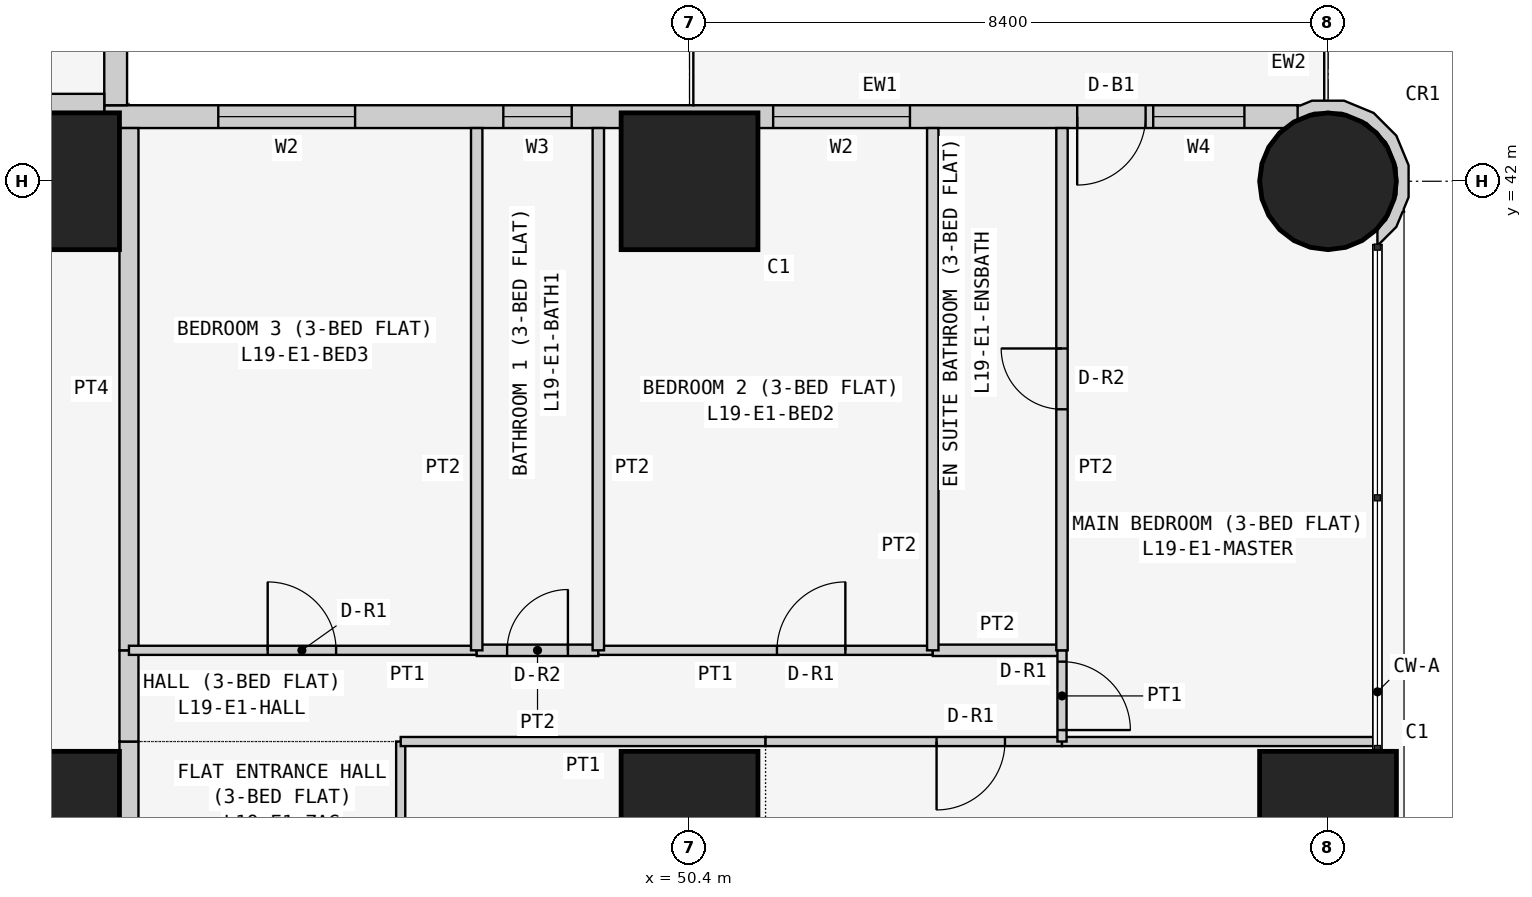
"""IFC4 building model, lengths in metres.
Left out: names, types, materials, properties, quantities, classifications, styles, units other than length and angle.
Written with IfcOpenShell. Run it as: python <this file> out.ifc"""

import sys

from ifc_helpers import new_model, si_unit, direction, frame, frame_2d, origin, origin_2d, place, context, subcontext, project, spatial, polyline, rectangle, circle, outline, extrude, element, fill, save


model = new_model("IFC4")
c1 = context("Model", 3, precision=1e-05, world=origin(), true_north=direction((0.0, 1.0)))
c2 = subcontext(c1, "Body", "Model", "MODEL_VIEW")
j1 = project(units=[si_unit("LENGTHUNIT", "METRE"), si_unit("PLANEANGLEUNIT", "RADIAN")], contexts=[c1])
p1 = place(None, origin())
s1 = spatial("IfcSite", under=j1, at=p1, CompositionType="ELEMENT")
p2 = place(p1, origin())
s2 = spatial("IfcBuilding", under=s1, at=p2, CompositionType="ELEMENT")
p3 = place(p2, frame((0.0, 0.0, 77.7)))
s3 = spatial("IfcBuildingStorey", under=s2, at=p3, CompositionType="ELEMENT", Elevation=77.7)
for number, where, z_axis, x_axis in (
    (1, (42.0, 33.6, 0.0), (0.0, 0.0, 1.0), (1.0, 0.0, 0.0)),
    (2, (42.0, 42.0, 0.0), (0.0, 0.0, 1.0), (1.0, 0.0, 0.0)),
    (3, (50.4, 33.6, 0.0), (0.0, 0.0, 1.0), (1.0, 0.0, 0.0)),
    (4, (50.4, 42.0, 0.0), (0.0, 0.0, 1.0), (1.0, 0.0, 0.0)),
    (5, (58.8, 33.6, 0.0), (0.0, 0.0, 1.0), (1.0, 0.0, 0.0)),
):
    element("IfcColumn", number, at=place(p3, frame(where, z_axis=z_axis, x_axis=x_axis)), inside=s3, PredefinedType="COLUMN", context=c2, shape_type="SweptSolid", body=[
        extrude(rectangle(XDim=1.8, YDim=1.8, at=origin_2d()), origin(), (0.0, 0.0, 1.0), 3.6),
    ])
p4 = place(p3, frame((58.8, 42.0, 0.0), z_axis=(0.0, 0.0, 1.0), x_axis=(1.0, 0.0, 0.0)))
e6 = element("IfcColumn", 6, at=p4, inside=s3, PredefinedType="COLUMN", context=c2, shape_type="SweptSolid", body=[
    extrude(circle(Radius=0.9, at=origin_2d()), origin(), (0.0, 0.0, 1.0), 3.6),
])
p5 = place(p3, frame((58.4, 42.85, 0.0), z_axis=(0.0, 0.0, 1.0), x_axis=(-1.0, 0.0, 0.0)))
e7 = element("IfcWall", 7, at=p5, inside=s3, PredefinedType="SOLIDWALL", context=c2, shape_type="SweptSolid", body=[
    extrude(rectangle(XDim=15.7, YDim=0.3, at=frame_2d((7.85, 0.0))), origin(), (0.0, 0.0, 1.0), 3.45),
])
p6 = place(p5, frame((12.4, 0.0, 0.9)))
e8 = element("IfcOpeningElement", 8, at=p6, cuts=e7, PredefinedType="OPENING", context=c2, shape_type="SweptSolid", body=[
    extrude(rectangle(XDim=1.8, YDim=1.5, at=frame_2d((0.9, 0.75))), frame((0.0, 0.16, 0.0), z_axis=(0.0, -1.0, 0.0), x_axis=(1.0, 0.0, 0.0)), (0.0, 0.0, 1.0), 0.32),
])
p7 = place(p5, frame((9.55, 0.0, 1.5)))
e9 = element("IfcOpeningElement", 9, at=p7, cuts=e7, PredefinedType="OPENING", context=c2, shape_type="SweptSolid", body=[
    extrude(rectangle(XDim=0.9, YDim=0.7, at=frame_2d((0.45, 0.35))), frame((0.0, 0.16, 0.0), z_axis=(0.0, -1.0, 0.0), x_axis=(1.0, 0.0, 0.0)), (0.0, 0.0, 1.0), 0.32),
])
p8 = place(p5, frame((5.1, 0.0, 0.9)))
e10 = element("IfcOpeningElement", 10, at=p8, cuts=e7, PredefinedType="OPENING", context=c2, shape_type="SweptSolid", body=[
    extrude(rectangle(XDim=1.8, YDim=1.5, at=frame_2d((0.9, 0.75))), frame((0.0, 0.16, 0.0), z_axis=(0.0, -1.0, 0.0), x_axis=(1.0, 0.0, 0.0)), (0.0, 0.0, 1.0), 0.32),
])
p9 = place(p5, frame((2.0, 0.0, 0.0)))
e11 = element("IfcOpeningElement", 11, at=p9, cuts=e7, PredefinedType="OPENING", context=c2, shape_type="SweptSolid", body=[
    extrude(rectangle(XDim=0.9, YDim=2.4, at=frame_2d((0.45, 1.2))), frame((0.0, 0.16, 0.0), z_axis=(0.0, -1.0, 0.0), x_axis=(1.0, 0.0, 0.0)), (0.0, 0.0, 1.0), 0.32),
])
p10 = place(p5, frame((0.7, 0.0, 0.9)))
e12 = element("IfcOpeningElement", 12, at=p10, cuts=e7, PredefinedType="OPENING", context=c2, shape_type="SweptSolid", body=[
    extrude(rectangle(XDim=1.2, YDim=1.5, at=frame_2d((0.6, 0.75))), frame((0.0, 0.16, 0.0), z_axis=(0.0, -1.0, 0.0), x_axis=(1.0, 0.0, 0.0)), (0.0, 0.0, 1.0), 0.32),
])
p11 = place(p3, frame((42.85, 43.0, 0.0), z_axis=(0.0, 0.0, 1.0), x_axis=(0.0, 1.0, 0.0)))
e13 = element("IfcWall", 13, at=p11, inside=s3, PredefinedType="SOLIDWALL", context=c2, shape_type="SweptSolid", body=[
    extrude(rectangle(XDim=15.4, YDim=0.3, at=frame_2d((7.7, 0.0))), origin(), (0.0, 0.0, 1.0), 3.45),
])
p12 = place(p11, frame((1.2, 0.0, 0.9)))
e14 = element("IfcOpeningElement", 14, at=p12, cuts=e13, PredefinedType="OPENING", context=c2, shape_type="SweptSolid", body=[
    extrude(rectangle(XDim=1.8, YDim=1.5, at=frame_2d((0.9, 0.75))), frame((0.0, 0.16, 0.0), z_axis=(0.0, -1.0, 0.0), x_axis=(1.0, 0.0, 0.0)), (0.0, 0.0, 1.0), 0.32),
])
p13 = place(p11, frame((4.95, 0.0, 1.5)))
e15 = element("IfcOpeningElement", 15, at=p13, cuts=e13, PredefinedType="OPENING", context=c2, shape_type="SweptSolid", body=[
    extrude(rectangle(XDim=0.9, YDim=0.7, at=frame_2d((0.45, 0.35))), frame((0.0, 0.16, 0.0), z_axis=(0.0, -1.0, 0.0), x_axis=(1.0, 0.0, 0.0)), (0.0, 0.0, 1.0), 0.32),
])
p14 = place(p11, frame((8.5, 0.0, 0.9)))
e16 = element("IfcOpeningElement", 16, at=p14, cuts=e13, PredefinedType="OPENING", context=c2, shape_type="SweptSolid", body=[
    extrude(rectangle(XDim=1.8, YDim=1.5, at=frame_2d((0.9, 0.75))), frame((0.0, 0.16, 0.0), z_axis=(0.0, -1.0, 0.0), x_axis=(1.0, 0.0, 0.0)), (0.0, 0.0, 1.0), 0.32),
])
p15 = place(p11, frame((12.5, 0.0, 0.0)))
e17 = element("IfcOpeningElement", 17, at=p15, cuts=e13, PredefinedType="OPENING", context=c2, shape_type="SweptSolid", body=[
    extrude(rectangle(XDim=0.9, YDim=2.4, at=frame_2d((0.45, 1.2))), frame((0.0, 0.16, 0.0), z_axis=(0.0, -1.0, 0.0), x_axis=(1.0, 0.0, 0.0)), (0.0, 0.0, 1.0), 0.32),
])
p16 = place(p11, frame((13.5, 0.0, 0.9)))
e18 = element("IfcOpeningElement", 18, at=p16, cuts=e13, PredefinedType="OPENING", context=c2, shape_type="SweptSolid", body=[
    extrude(rectangle(XDim=1.2, YDim=1.5, at=frame_2d((0.6, 0.75))), frame((0.0, 0.16, 0.0), z_axis=(0.0, -1.0, 0.0), x_axis=(1.0, 0.0, 0.0)), (0.0, 0.0, 1.0), 0.32),
])
p17 = place(p3, frame((59.411, 41.233, 0.0), z_axis=(0.0, 0.0, 1.0), x_axis=(0.926129809145, 0.377204953059, 0.0)))
e19 = element("IfcWall", 19, at=p17, inside=s3, PredefinedType="SOLIDWALL", context=c2, shape_type="SweptSolid", body=[
    extrude(outline(polyline([(0.626, 0.345), (0.785, 0.736), (0.782, 1.157), (0.619, 1.546), (0.319, 1.843), (-0.072, 2.002), (-0.24, 2.001), (-0.27, 2.017), (-0.37, 1.841), (-0.102, 1.842), (0.23, 1.707), (0.485, 1.455), (0.624, 1.125), (0.626, 0.766), (0.491, 0.434), (0.238, 0.179), (0.09, 0.117), (0.011, -0.078), (0.024, -0.083), (0.329, 0.045), (0.48, 0.198), (0.499, 0.193), (0.508, 0.225), (0.626, 0.345)])), origin(), (0.0, 0.0, 1.0), 3.45),
])
p18 = place(p3, frame((35.829, 43.025, 0.0), z_axis=(0.0, 0.0, 1.0), x_axis=(1.0, 0.0, 0.0)))
e20 = element("IfcWall", 20, at=p18, inside=s3, PredefinedType="PARTITIONING", context=c2, shape_type="SweptSolid", body=[
    extrude(rectangle(XDim=6.871, YDim=0.25, at=frame_2d((3.436, 0.0))), origin(), (0.0, 0.0, 1.0), 3.45),
])
p19 = place(p3, frame((43.025, 34.629, 0.0), z_axis=(0.0, 0.0, 1.0), x_axis=(0.0, -1.0, 0.0)))
e21 = element("IfcWall", 21, at=p19, inside=s3, PredefinedType="PARTITIONING", context=c2, shape_type="SweptSolid", body=[
    extrude(rectangle(XDim=5.229, YDim=0.25, at=frame_2d((2.615, 0.0))), origin(), (0.0, 0.0, 1.0), 3.45),
])
p20 = place(p19, frame((2.129, 0.0, 0.0)))
e22 = element("IfcOpeningElement", 22, at=p20, cuts=e21, PredefinedType="OPENING", context=c2, shape_type="SweptSolid", body=[
    extrude(rectangle(XDim=1.0, YDim=2.1, at=frame_2d((0.5, 1.05))), frame((0.0, 0.135, 0.0), z_axis=(0.0, -1.0, 0.0), x_axis=(1.0, 0.0, 0.0)), (0.0, 0.0, 1.0), 0.27),
])
p21 = place(p3, frame((43.025, 35.829, 0.0), z_axis=(0.0, 0.0, 1.0), x_axis=(0.0, -1.0, 0.0)))
e23 = element("IfcWall", 23, at=p21, inside=s3, PredefinedType="PARTITIONING", context=c2, shape_type="SweptSolid", body=[
    extrude(rectangle(XDim=1.2, YDim=0.25, at=frame_2d((0.6, 0.0))), origin(), (0.0, 0.0, 1.0), 3.45),
])
p22 = place(p3, frame((43.025, 42.7, 0.0), z_axis=(0.0, 0.0, 1.0), x_axis=(0.0, -1.0, 0.0)))
e24 = element("IfcWall", 24, at=p22, inside=s3, PredefinedType="PARTITIONING", context=c2, shape_type="SweptSolid", body=[
    extrude(rectangle(XDim=6.871, YDim=0.25, at=frame_2d((3.436, 0.0))), origin(), (0.0, 0.0, 1.0), 3.45),
])
p23 = place(p3, frame((46.6, 29.4, 0.0), z_axis=(0.0, 0.0, 1.0), x_axis=(0.0, 1.0, 0.0)))
e25 = element("IfcWall", 25, at=p23, inside=s3, PredefinedType="PARTITIONING", context=c2, shape_type="SweptSolid", body=[
    extrude(rectangle(XDim=5.229, YDim=0.12, at=frame_2d((2.615, 0.0))), origin(), (0.0, 0.0, 1.0), 3.45),
])
p24 = place(p23, frame((1.05, 0.0, 0.0)))
e26 = element("IfcOpeningElement", 26, at=p24, cuts=e25, PredefinedType="OPENING", context=c2, shape_type="SweptSolid", body=[
    extrude(rectangle(XDim=0.9, YDim=2.1, at=frame_2d((0.45, 1.05))), frame((0.0, 0.07, 0.0), z_axis=(0.0, -1.0, 0.0), x_axis=(1.0, 0.0, 0.0)), (0.0, 0.0, 1.0), 0.14),
])
p25 = place(p3, frame((51.4, 34.629, 0.0), z_axis=(0.0, 0.0, 1.0), x_axis=(-1.0, 0.0, 0.0)))
e27 = element("IfcWall", 27, at=p25, inside=s3, PredefinedType="PARTITIONING", context=c2, shape_type="SweptSolid", body=[
    extrude(rectangle(XDim=4.8, YDim=0.12, at=frame_2d((2.4, 0.0))), origin(), (0.0, 0.0, 1.0), 3.45),
])
p26 = place(p3, frame((55.3, 34.629, 0.0), z_axis=(0.0, 0.0, 1.0), x_axis=(-1.0, 0.0, 0.0)))
e28 = element("IfcWall", 28, at=p26, inside=s3, PredefinedType="PARTITIONING", context=c2, shape_type="SweptSolid", body=[
    extrude(rectangle(XDim=3.9, YDim=0.12, at=frame_2d((1.95, 0.0))), origin(), (0.0, 0.0, 1.0), 3.45),
])
p27 = place(p26, frame((0.75, 0.0, 0.0)))
e29 = element("IfcOpeningElement", 29, at=p27, cuts=e28, PredefinedType="OPENING", context=c2, shape_type="SweptSolid", body=[
    extrude(rectangle(XDim=0.9, YDim=2.1, at=frame_2d((0.45, 1.05))), frame((0.0, 0.07, 0.0), z_axis=(0.0, -1.0, 0.0), x_axis=(1.0, 0.0, 0.0)), (0.0, 0.0, 1.0), 0.14),
])
p28 = place(p3, frame((59.45, 34.629, 0.0), z_axis=(0.0, 0.0, 1.0), x_axis=(-1.0, 0.0, 0.0)))
e30 = element("IfcWall", 30, at=p28, inside=s3, PredefinedType="PARTITIONING", context=c2, shape_type="SweptSolid", body=[
    extrude(rectangle(XDim=4.15, YDim=0.12, at=frame_2d((2.075, 0.0))), origin(), (0.0, 0.0, 1.0), 3.45),
])
p29 = place(p3, frame((47.6, 35.829, 0.0), z_axis=(0.0, 0.0, 1.0), x_axis=(-1.0, 0.0, 0.0)))
e31 = element("IfcWall", 31, at=p29, inside=s3, PredefinedType="PARTITIONING", context=c2, shape_type="SweptSolid", body=[
    extrude(rectangle(XDim=4.575, YDim=0.12, at=frame_2d((2.288, 0.0))), origin(), (0.0, 0.0, 1.0), 3.45),
])
p30 = place(p29, frame((1.85, 0.0, 0.0)))
e32 = element("IfcOpeningElement", 32, at=p30, cuts=e31, PredefinedType="OPENING", context=c2, shape_type="SweptSolid", body=[
    extrude(rectangle(XDim=0.9, YDim=2.1, at=frame_2d((0.45, 1.05))), frame((0.0, 0.07, 0.0), z_axis=(0.0, -1.0, 0.0), x_axis=(1.0, 0.0, 0.0)), (0.0, 0.0, 1.0), 0.14),
])
p31 = place(p3, frame((49.2, 35.829, 0.0), z_axis=(0.0, 0.0, 1.0), x_axis=(-1.0, 0.0, 0.0)))
e33 = element("IfcWall", 33, at=p31, inside=s3, PredefinedType="PARTITIONING", context=c2, shape_type="SweptSolid", body=[
    extrude(rectangle(XDim=1.6, YDim=0.15, at=frame_2d((0.8, 0.0))), origin(), (0.0, 0.0, 1.0), 3.45),
])
p32 = place(p31, frame((0.4, 0.0, 0.0)))
e34 = element("IfcOpeningElement", 34, at=p32, cuts=e33, PredefinedType="OPENING", context=c2, shape_type="SweptSolid", body=[
    extrude(rectangle(XDim=0.8, YDim=2.1, at=frame_2d((0.4, 1.05))), frame((0.0, 0.085, 0.0), z_axis=(0.0, -1.0, 0.0), x_axis=(1.0, 0.0, 0.0)), (0.0, 0.0, 1.0), 0.17),
])
p33 = place(p3, frame((53.6, 35.829, 0.0), z_axis=(0.0, 0.0, 1.0), x_axis=(-1.0, 0.0, 0.0)))
e35 = element("IfcWall", 35, at=p33, inside=s3, PredefinedType="PARTITIONING", context=c2, shape_type="SweptSolid", body=[
    extrude(rectangle(XDim=4.4, YDim=0.12, at=frame_2d((2.2, 0.0))), origin(), (0.0, 0.0, 1.0), 3.45),
])
p34 = place(p33, frame((1.15, 0.0, 0.0)))
e36 = element("IfcOpeningElement", 36, at=p34, cuts=e35, PredefinedType="OPENING", context=c2, shape_type="SweptSolid", body=[
    extrude(rectangle(XDim=0.9, YDim=2.1, at=frame_2d((0.45, 1.05))), frame((0.0, 0.07, 0.0), z_axis=(0.0, -1.0, 0.0), x_axis=(1.0, 0.0, 0.0)), (0.0, 0.0, 1.0), 0.14),
])
p35 = place(p3, frame((55.3, 35.829, 0.0), z_axis=(0.0, 0.0, 1.0), x_axis=(-1.0, 0.0, 0.0)))
e37 = element("IfcWall", 37, at=p35, inside=s3, PredefinedType="PARTITIONING", context=c2, shape_type="SweptSolid", body=[
    extrude(rectangle(XDim=1.7, YDim=0.15, at=frame_2d((0.85, 0.0))), origin(), (0.0, 0.0, 1.0), 3.45),
])
p36 = place(p3, frame((55.3, 34.629, 0.0), z_axis=(0.0, 0.0, 1.0), x_axis=(0.0, 1.0, 0.0)))
e38 = element("IfcWall", 38, at=p36, inside=s3, PredefinedType="PARTITIONING", context=c2, shape_type="SweptSolid", body=[
    extrude(rectangle(XDim=1.2, YDim=0.12, at=frame_2d((0.6, 0.0))), origin(), (0.0, 0.0, 1.0), 3.45),
])
p37 = place(p36, frame((0.151, 0.0, 0.0)))
e39 = element("IfcOpeningElement", 39, at=p37, cuts=e38, PredefinedType="OPENING", context=c2, shape_type="SweptSolid", body=[
    extrude(rectangle(XDim=0.9, YDim=2.1, at=frame_2d((0.45, 1.05))), frame((0.0, 0.07, 0.0), z_axis=(0.0, -1.0, 0.0), x_axis=(1.0, 0.0, 0.0)), (0.0, 0.0, 1.0), 0.14),
])
for number, where, z_axis, x_axis in (
    (40, (47.6, 35.829, 0.0), (0.0, 0.0, 1.0), (0.0, 1.0, 0.0)),
    (41, (49.2, 35.829, 0.0), (0.0, 0.0, 1.0), (0.0, 1.0, 0.0)),
    (42, (53.6, 35.829, 0.0), (0.0, 0.0, 1.0), (0.0, 1.0, 0.0)),
):
    element("IfcWall", number, at=place(p3, frame(where, z_axis=z_axis, x_axis=x_axis)), inside=s3, PredefinedType="PARTITIONING", context=c2, shape_type="SweptSolid", body=[
        extrude(rectangle(XDim=6.871, YDim=0.15, at=frame_2d((3.436, 0.0))), origin(), (0.0, 0.0, 1.0), 3.45),
    ])
p38 = place(p3, frame((55.3, 35.829, 0.0), z_axis=(0.0, 0.0, 1.0), x_axis=(0.0, 1.0, 0.0)))
e43 = element("IfcWall", 43, at=p38, inside=s3, PredefinedType="PARTITIONING", context=c2, shape_type="SweptSolid", body=[
    extrude(rectangle(XDim=6.871, YDim=0.15, at=frame_2d((3.436, 0.0))), origin(), (0.0, 0.0, 1.0), 3.45),
])
p39 = place(p38, frame((3.171, 0.0, 0.0)))
e44 = element("IfcOpeningElement", 44, at=p39, cuts=e43, PredefinedType="OPENING", context=c2, shape_type="SweptSolid", body=[
    extrude(rectangle(XDim=0.8, YDim=2.1, at=frame_2d((0.4, 1.05))), frame((0.0, 0.085, 0.0), z_axis=(0.0, -1.0, 0.0), x_axis=(1.0, 0.0, 0.0)), (0.0, 0.0, 1.0), 0.17),
])
p40 = place(p6, origin())
e45 = element("IfcWindow", 45, at=p40, inside=s3, PartitioningType="SINGLE_PANEL", PredefinedType="WINDOW", context=c2, shape_type="SweptSolid", body=[
    extrude(rectangle(XDim=1.8, YDim=1.5, at=frame_2d((0.9, 0.75))), frame((0.0, 0.03, 0.0), z_axis=(0.0, -1.0, 0.0), x_axis=(1.0, 0.0, 0.0)), (0.0, 0.0, 1.0), 0.06),
])
fill(e8, e45)
p41 = place(p7, origin())
e46 = element("IfcWindow", 46, at=p41, inside=s3, PartitioningType="SINGLE_PANEL", PredefinedType="WINDOW", context=c2, shape_type="SweptSolid", body=[
    extrude(rectangle(XDim=0.9, YDim=0.7, at=frame_2d((0.45, 0.35))), frame((0.0, 0.03, 0.0), z_axis=(0.0, -1.0, 0.0), x_axis=(1.0, 0.0, 0.0)), (0.0, 0.0, 1.0), 0.06),
])
fill(e9, e46)
p42 = place(p8, origin())
e47 = element("IfcWindow", 47, at=p42, inside=s3, PartitioningType="SINGLE_PANEL", PredefinedType="WINDOW", context=c2, shape_type="SweptSolid", body=[
    extrude(rectangle(XDim=1.8, YDim=1.5, at=frame_2d((0.9, 0.75))), frame((0.0, 0.03, 0.0), z_axis=(0.0, -1.0, 0.0), x_axis=(1.0, 0.0, 0.0)), (0.0, 0.0, 1.0), 0.06),
])
fill(e10, e47)
p43 = place(p9, origin())
e48 = element("IfcDoor", 48, at=p43, inside=s3, OperationType="SINGLE_SWING_RIGHT", PredefinedType="DOOR", context=c2, shape_type="SweptSolid", body=[
    extrude(rectangle(XDim=0.9, YDim=2.4, at=frame_2d((0.45, 1.2))), frame((0.0, 0.025, 0.0), z_axis=(0.0, -1.0, 0.0), x_axis=(1.0, 0.0, 0.0)), (0.0, 0.0, 1.0), 0.05),
])
fill(e11, e48)
p44 = place(p10, origin())
e49 = element("IfcWindow", 49, at=p44, inside=s3, PartitioningType="SINGLE_PANEL", PredefinedType="WINDOW", context=c2, shape_type="SweptSolid", body=[
    extrude(rectangle(XDim=1.2, YDim=1.5, at=frame_2d((0.6, 0.75))), frame((0.0, 0.03, 0.0), z_axis=(0.0, -1.0, 0.0), x_axis=(1.0, 0.0, 0.0)), (0.0, 0.0, 1.0), 0.06),
])
fill(e12, e49)
p45 = place(p27, origin())
e50 = element("IfcDoor", 50, at=p45, inside=s3, OperationType="SINGLE_SWING_RIGHT", PredefinedType="DOOR", context=c2, shape_type="SweptSolid", body=[
    extrude(rectangle(XDim=0.9, YDim=2.1, at=frame_2d((0.45, 1.05))), frame((0.0, 0.025, 0.0), z_axis=(0.0, -1.0, 0.0), x_axis=(1.0, 0.0, 0.0)), (0.0, 0.0, 1.0), 0.05),
])
fill(e29, e50)
p46 = place(p30, frame((0.9, 0.0, 0.0), z_axis=(0.0, 0.0, 1.0), x_axis=(-1.0, 0.0, 0.0)))
e51 = element("IfcDoor", 51, at=p46, inside=s3, OperationType="SINGLE_SWING_LEFT", PredefinedType="DOOR", context=c2, shape_type="SweptSolid", body=[
    extrude(rectangle(XDim=0.9, YDim=2.1, at=frame_2d((0.45, 1.05))), frame((0.0, 0.025, 0.0), z_axis=(0.0, -1.0, 0.0), x_axis=(1.0, 0.0, 0.0)), (0.0, 0.0, 1.0), 0.05),
])
fill(e32, e51)
p47 = place(p32, frame((0.8, 0.0, 0.0), z_axis=(0.0, 0.0, 1.0), x_axis=(-1.0, 0.0, 0.0)))
e52 = element("IfcDoor", 52, at=p47, inside=s3, OperationType="SINGLE_SWING_RIGHT", PredefinedType="DOOR", context=c2, shape_type="SweptSolid", body=[
    extrude(rectangle(XDim=0.8, YDim=2.1, at=frame_2d((0.4, 1.05))), frame((0.0, 0.025, 0.0), z_axis=(0.0, -1.0, 0.0), x_axis=(1.0, 0.0, 0.0)), (0.0, 0.0, 1.0), 0.05),
])
fill(e34, e52)
p48 = place(p34, frame((0.9, 0.0, 0.0), z_axis=(0.0, 0.0, 1.0), x_axis=(-1.0, 0.0, 0.0)))
e53 = element("IfcDoor", 53, at=p48, inside=s3, OperationType="SINGLE_SWING_RIGHT", PredefinedType="DOOR", context=c2, shape_type="SweptSolid", body=[
    extrude(rectangle(XDim=0.9, YDim=2.1, at=frame_2d((0.45, 1.05))), frame((0.0, 0.025, 0.0), z_axis=(0.0, -1.0, 0.0), x_axis=(1.0, 0.0, 0.0)), (0.0, 0.0, 1.0), 0.05),
])
fill(e36, e53)
p49 = place(p37, frame((0.9, 0.0, 0.0), z_axis=(0.0, 0.0, 1.0), x_axis=(-1.0, 0.0, 0.0)))
e54 = element("IfcDoor", 54, at=p49, inside=s3, OperationType="SINGLE_SWING_RIGHT", PredefinedType="DOOR", context=c2, shape_type="SweptSolid", body=[
    extrude(rectangle(XDim=0.9, YDim=2.1, at=frame_2d((0.45, 1.05))), frame((0.0, 0.025, 0.0), z_axis=(0.0, -1.0, 0.0), x_axis=(1.0, 0.0, 0.0)), (0.0, 0.0, 1.0), 0.05),
])
fill(e39, e54)
p50 = place(p39, origin())
e55 = element("IfcDoor", 55, at=p50, inside=s3, OperationType="SINGLE_SWING_RIGHT", PredefinedType="DOOR", context=c2, shape_type="SweptSolid", body=[
    extrude(rectangle(XDim=0.8, YDim=2.1, at=frame_2d((0.4, 1.05))), frame((0.0, 0.025, 0.0), z_axis=(0.0, -1.0, 0.0), x_axis=(1.0, 0.0, 0.0)), (0.0, 0.0, 1.0), 0.05),
])
fill(e44, e55)
save(model, sys.argv[1])
